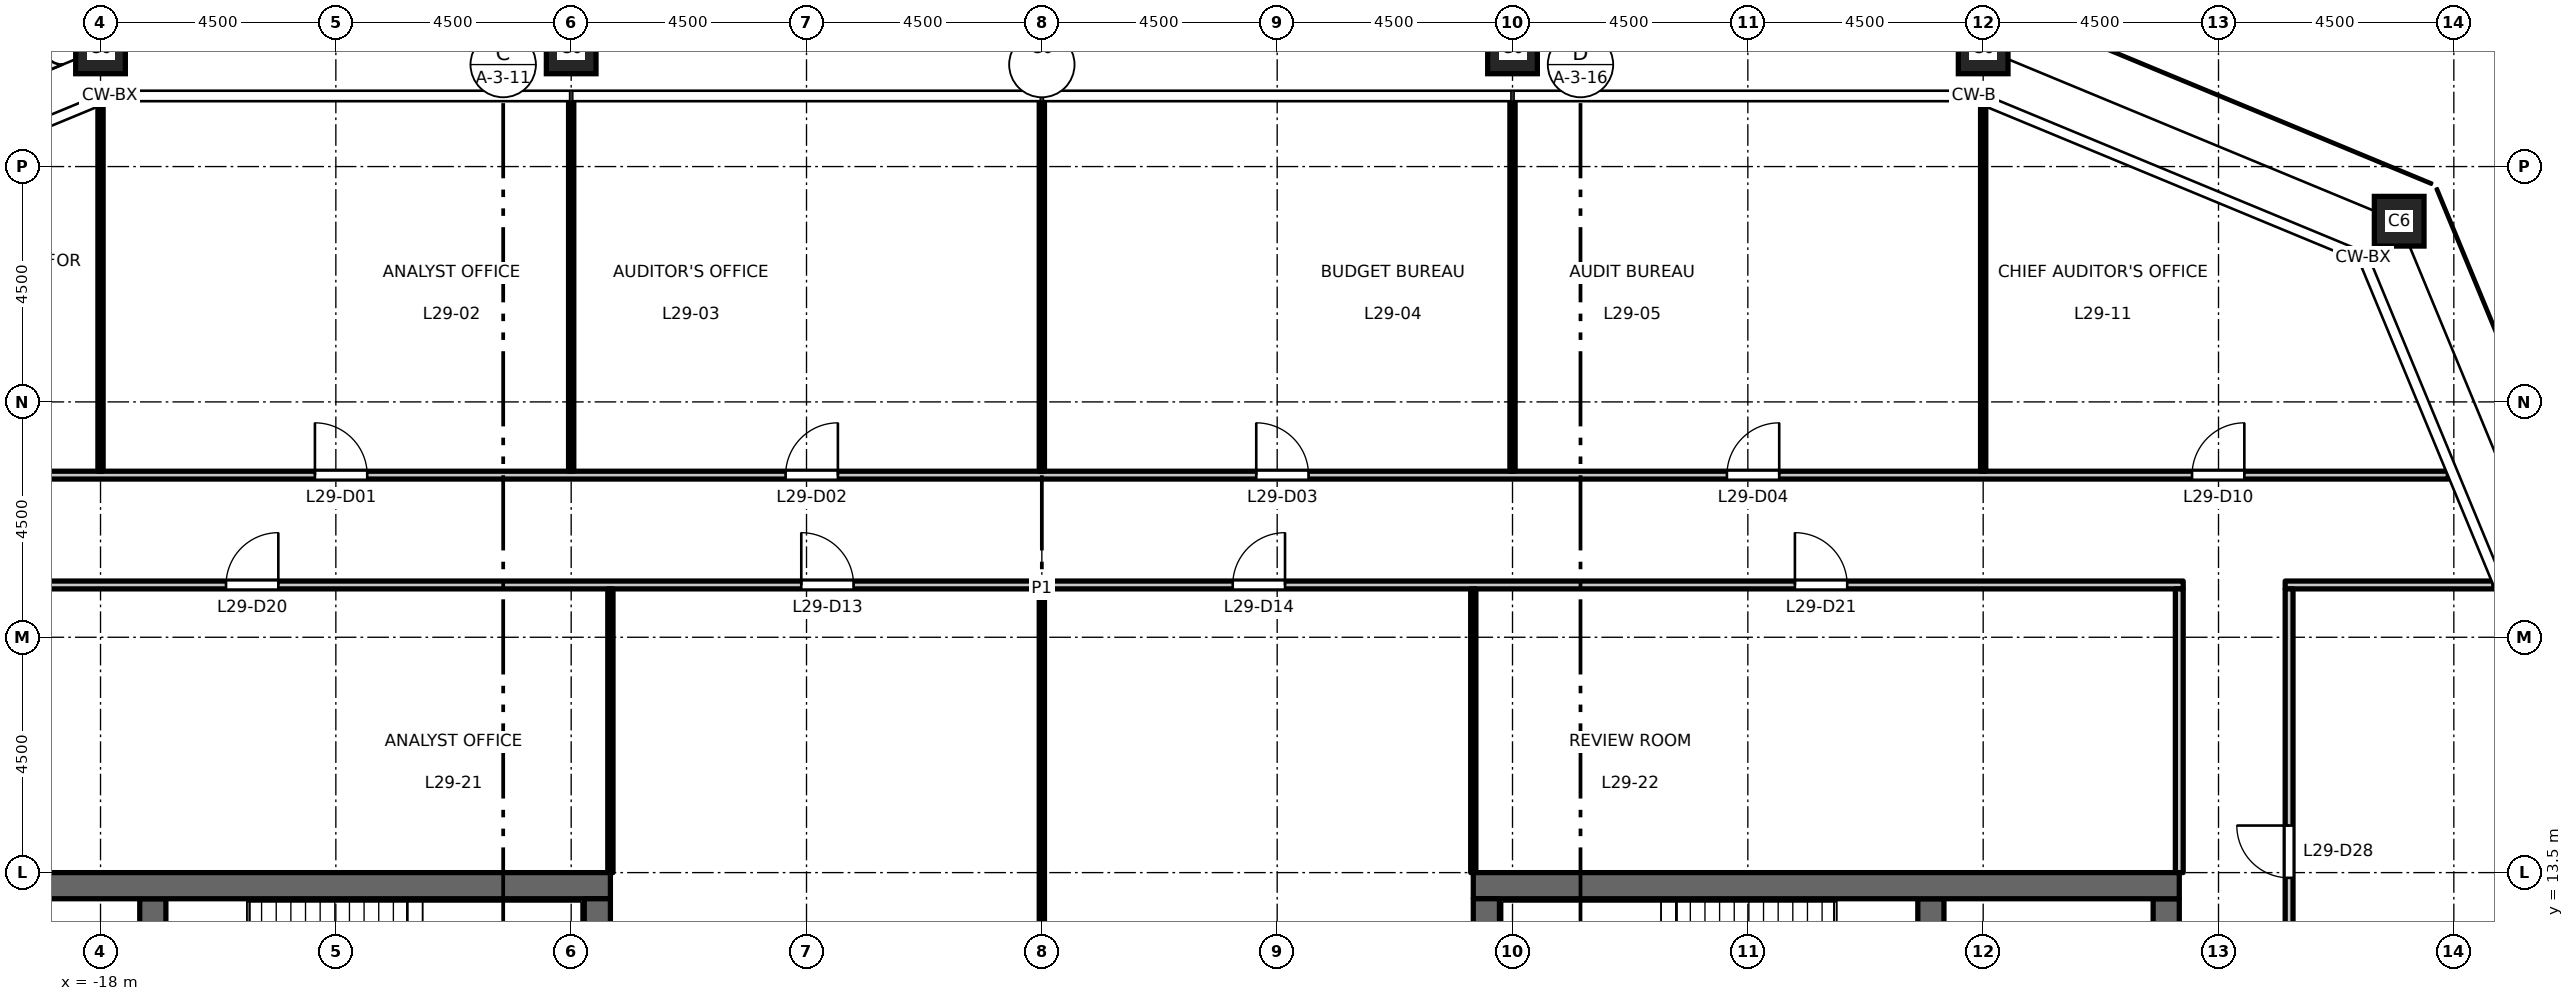
"""IFC4 building model, lengths in metres.
Left out: names, types, materials, properties, quantities, classifications, styles, units other than length and angle.
Written with IfcOpenShell. Run it as: python <this file> out.ifc"""

import sys

from ifc_helpers import new_model, si_unit, direction, frame, frame_2d, origin, origin_2d, place, context, subcontext, project, spatial, rectangle, hollow_rectangle, extrude, element, fill, save


model = new_model("IFC4")
c1 = context("Model", 3, precision=1e-05, world=origin(), true_north=direction((0.0, 1.0)))
c2 = subcontext(c1, "Body", "Model", "MODEL_VIEW")
j1 = project(units=[si_unit("LENGTHUNIT", "METRE"), si_unit("PLANEANGLEUNIT", "RADIAN")], contexts=[c1])
p1 = place(None, origin())
s1 = spatial("IfcSite", under=j1, at=p1, CompositionType="ELEMENT")
p2 = place(p1, origin())
s2 = spatial("IfcBuilding", under=s1, at=p2, CompositionType="ELEMENT")
p3 = place(p2, frame((0.0, 0.0, 136.2)))
s3 = spatial("IfcBuildingStorey", under=s2, at=p3, CompositionType="ELEMENT", Elevation=136.2)
for number, where, z_axis, x_axis in (
    (1, (25.955, 25.955, 0.0), (0.0, 0.0, 1.0), (1.0, 0.0, 0.0)),
    (2, (18.0, 29.25, 0.0), (0.0, 0.0, 1.0), (1.0, 0.0, 0.0)),
    (3, (9.0, 29.25, 0.0), (0.0, 0.0, 1.0), (1.0, 0.0, 0.0)),
    (4, (0.0, 29.25, 0.0), (0.0, 0.0, 1.0), (1.0, 0.0, 0.0)),
    (5, (-9.0, 29.25, 0.0), (0.0, 0.0, 1.0), (1.0, 0.0, 0.0)),
    (6, (-18.0, 29.25, 0.0), (0.0, 0.0, 1.0), (1.0, 0.0, 0.0)),
):
    element("IfcColumn", number, at=place(p3, frame(where, z_axis=z_axis, x_axis=x_axis)), inside=s3, PredefinedType="COLUMN", context=c2, shape_type="SweptSolid", body=[
        extrude(hollow_rectangle(XDim=0.95, YDim=0.95, WallThickness=0.055, at=origin_2d()), origin(), (0.0, 0.0, 1.0), 4.5),
    ])
p4 = place(p3, frame((-17.0, 6.425, 0.0), z_axis=(0.0, 0.0, 1.0), x_axis=(0.0, 1.0, 0.0)))
e7 = element("IfcWall", 7, at=p4, inside=s3, PredefinedType="SHEAR", context=c2, shape_type="SweptSolid", body=[
    extrude(rectangle(XDim=6.575, YDim=0.5, at=frame_2d((3.288, 0.0))), origin(), (0.0, 0.0, 1.0), 4.35),
])
p5 = place(p3, frame((-8.25, 13.25, 0.0), z_axis=(0.0, 0.0, 1.0), x_axis=(-1.0, 0.0, 0.0)))
e8 = element("IfcWall", 8, at=p5, inside=s3, PredefinedType="SHEAR", context=c2, shape_type="SweptSolid", body=[
    extrude(rectangle(XDim=13.5, YDim=0.5, at=frame_2d((6.75, 0.0))), origin(), (0.0, 0.0, 1.0), 4.35),
])
p6 = place(p3, frame((-8.5, -13.0, 0.0), z_axis=(0.0, 0.0, 1.0), x_axis=(0.0, 1.0, 0.0)))
e9 = element("IfcWall", 9, at=p6, inside=s3, PredefinedType="SHEAR", context=c2, shape_type="SweptSolid", body=[
    extrude(rectangle(XDim=26.0, YDim=0.5, at=frame_2d((13.0, 0.0))), origin(), (0.0, 0.0, 1.0), 4.35),
])
p7 = place(p3, frame((21.5, -13.0, 0.0), z_axis=(0.0, 0.0, 1.0), x_axis=(0.0, 1.0, 0.0)))
e10 = element("IfcWall", 10, at=p7, inside=s3, PredefinedType="SHEAR", context=c2, shape_type="SweptSolid", body=[
    extrude(rectangle(XDim=26.0, YDim=0.5, at=frame_2d((13.0, 0.0))), origin(), (0.0, 0.0, 1.0), 4.35),
])
p8 = place(p7, frame((16.825, 0.0, 0.0)))
e11 = element("IfcOpeningElement", 11, at=p8, cuts=e10, PredefinedType="OPENING", context=c2, shape_type="SweptSolid", body=[
    extrude(rectangle(XDim=1.8, YDim=2.1, at=frame_2d((0.9, 1.05))), frame((0.0, 0.26, 0.0), z_axis=(0.0, -1.0, 0.0), x_axis=(1.0, 0.0, 0.0)), (0.0, 0.0, 1.0), 0.52),
])
p9 = place(p7, frame((7.375, 0.0, 0.0)))
e12 = element("IfcOpeningElement", 12, at=p9, cuts=e10, PredefinedType="OPENING", context=c2, shape_type="SweptSolid", body=[
    extrude(rectangle(XDim=1.8, YDim=2.1, at=frame_2d((0.9, 1.05))), frame((0.0, 0.26, 0.0), z_axis=(0.0, -1.0, 0.0), x_axis=(1.0, 0.0, 0.0)), (0.0, 0.0, 1.0), 0.52),
])
p10 = place(p7, frame((2.65, 0.0, 0.0)))
e13 = element("IfcOpeningElement", 13, at=p10, cuts=e10, PredefinedType="OPENING", context=c2, shape_type="SweptSolid", body=[
    extrude(rectangle(XDim=0.9, YDim=2.1, at=frame_2d((0.45, 1.05))), frame((0.0, 0.26, 0.0), z_axis=(0.0, -1.0, 0.0), x_axis=(1.0, 0.0, 0.0)), (0.0, 0.0, 1.0), 0.52),
])
p11 = place(p3, frame((17.0, 6.425, 0.0), z_axis=(0.0, 0.0, 1.0), x_axis=(0.0, 1.0, 0.0)))
e14 = element("IfcWall", 14, at=p11, inside=s3, PredefinedType="SHEAR", context=c2, shape_type="SweptSolid", body=[
    extrude(rectangle(XDim=6.575, YDim=0.5, at=frame_2d((3.288, 0.0))), origin(), (0.0, 0.0, 1.0), 4.35),
])
p12 = place(p3, frame((8.25, 13.25, 0.0), z_axis=(0.0, 0.0, 1.0), x_axis=(1.0, 0.0, 0.0)))
e15 = element("IfcWall", 15, at=p12, inside=s3, PredefinedType="SHEAR", context=c2, shape_type="SweptSolid", body=[
    extrude(rectangle(XDim=13.5, YDim=0.5, at=frame_2d((6.75, 0.0))), origin(), (0.0, 0.0, 1.0), 4.35),
])
p13 = place(p3, frame((8.5, -13.0, 0.0), z_axis=(0.0, 0.0, 1.0), x_axis=(0.0, 1.0, 0.0)))
e16 = element("IfcWall", 16, at=p13, inside=s3, PredefinedType="SHEAR", context=c2, shape_type="SweptSolid", body=[
    extrude(rectangle(XDim=26.0, YDim=0.5, at=frame_2d((13.0, 0.0))), origin(), (0.0, 0.0, 1.0), 4.35),
])
p14 = place(p3, frame((-21.825, 19.0, 0.0), z_axis=(0.0, 0.0, 1.0), x_axis=(1.0, 0.0, 0.0)))
e17 = element("IfcWall", 17, at=p14, inside=s3, PredefinedType="PARTITIONING", context=c2, shape_type="SweptSolid", body=[
    extrude(rectangle(XDim=43.65, YDim=0.15, at=frame_2d((21.825, 0.0))), origin(), (0.0, 0.0, 1.0), 4.35),
])
p15 = place(p14, frame((17.225, 0.0, 0.0)))
e18 = element("IfcOpeningElement", 18, at=p15, cuts=e17, PredefinedType="OPENING", context=c2, shape_type="SweptSolid", body=[
    extrude(rectangle(XDim=1.0, YDim=2.1, at=frame_2d((0.5, 1.05))), frame((0.0, 0.085, 0.0), z_axis=(0.0, -1.0, 0.0), x_axis=(1.0, 0.0, 0.0)), (0.0, 0.0, 1.0), 0.17),
])
p16 = place(p14, frame((25.475, 0.0, 0.0)))
e19 = element("IfcOpeningElement", 19, at=p16, cuts=e17, PredefinedType="OPENING", context=c2, shape_type="SweptSolid", body=[
    extrude(rectangle(XDim=1.0, YDim=2.1, at=frame_2d((0.5, 1.05))), frame((0.0, 0.085, 0.0), z_axis=(0.0, -1.0, 0.0), x_axis=(1.0, 0.0, 0.0)), (0.0, 0.0, 1.0), 0.17),
])
p17 = place(p14, frame((6.225, 0.0, 0.0)))
e20 = element("IfcOpeningElement", 20, at=p17, cuts=e17, PredefinedType="OPENING", context=c2, shape_type="SweptSolid", body=[
    extrude(rectangle(XDim=1.0, YDim=2.1, at=frame_2d((0.5, 1.05))), frame((0.0, 0.085, 0.0), z_axis=(0.0, -1.0, 0.0), x_axis=(1.0, 0.0, 0.0)), (0.0, 0.0, 1.0), 0.17),
])
p18 = place(p14, frame((36.225, 0.0, 0.0)))
e21 = element("IfcOpeningElement", 21, at=p18, cuts=e17, PredefinedType="OPENING", context=c2, shape_type="SweptSolid", body=[
    extrude(rectangle(XDim=1.0, YDim=2.1, at=frame_2d((0.5, 1.05))), frame((0.0, 0.085, 0.0), z_axis=(0.0, -1.0, 0.0), x_axis=(1.0, 0.0, 0.0)), (0.0, 0.0, 1.0), 0.17),
])
p19 = place(p3, frame((23.775, 19.0, 0.0), z_axis=(0.0, 0.0, 1.0), x_axis=(1.0, 0.0, 0.0)))
e22 = element("IfcWall", 22, at=p19, inside=s3, PredefinedType="PARTITIONING", context=c2, shape_type="SweptSolid", body=[
    extrude(rectangle(XDim=3.989, YDim=0.15, at=frame_2d((1.995, 0.0))), origin(), (0.0, 0.0, 1.0), 4.35),
])
p20 = place(p3, frame((-26.894, 21.1, 0.0), z_axis=(0.0, 0.0, 1.0), x_axis=(1.0, 0.0, 0.0)))
e23 = element("IfcWall", 23, at=p20, inside=s3, PredefinedType="PARTITIONING", context=c2, shape_type="SweptSolid", body=[
    extrude(rectangle(XDim=53.788, YDim=0.15, at=frame_2d((26.894, 0.0))), origin(), (0.0, 0.0, 1.0), 4.35),
])
p21 = place(p20, frame((12.994, 0.0, 0.0)))
e24 = element("IfcOpeningElement", 24, at=p21, cuts=e23, PredefinedType="OPENING", context=c2, shape_type="SweptSolid", body=[
    extrude(rectangle(XDim=1.0, YDim=2.1, at=frame_2d((0.5, 1.05))), frame((0.0, 0.085, 0.0), z_axis=(0.0, -1.0, 0.0), x_axis=(1.0, 0.0, 0.0)), (0.0, 0.0, 1.0), 0.17),
])
p22 = place(p20, frame((21.994, 0.0, 0.0)))
e25 = element("IfcOpeningElement", 25, at=p22, cuts=e23, PredefinedType="OPENING", context=c2, shape_type="SweptSolid", body=[
    extrude(rectangle(XDim=1.0, YDim=2.1, at=frame_2d((0.5, 1.05))), frame((0.0, 0.085, 0.0), z_axis=(0.0, -1.0, 0.0), x_axis=(1.0, 0.0, 0.0)), (0.0, 0.0, 1.0), 0.17),
])
p23 = place(p20, frame((30.994, 0.0, 0.0)))
e26 = element("IfcOpeningElement", 26, at=p23, cuts=e23, PredefinedType="OPENING", context=c2, shape_type="SweptSolid", body=[
    extrude(rectangle(XDim=1.0, YDim=2.1, at=frame_2d((0.5, 1.05))), frame((0.0, 0.085, 0.0), z_axis=(0.0, -1.0, 0.0), x_axis=(1.0, 0.0, 0.0)), (0.0, 0.0, 1.0), 0.17),
])
p24 = place(p20, frame((39.994, 0.0, 0.0)))
e27 = element("IfcOpeningElement", 27, at=p24, cuts=e23, PredefinedType="OPENING", context=c2, shape_type="SweptSolid", body=[
    extrude(rectangle(XDim=1.0, YDim=2.1, at=frame_2d((0.5, 1.05))), frame((0.0, 0.085, 0.0), z_axis=(0.0, -1.0, 0.0), x_axis=(1.0, 0.0, 0.0)), (0.0, 0.0, 1.0), 0.17),
])
p25 = place(p20, frame((3.994, 0.0, 0.0)))
e28 = element("IfcOpeningElement", 28, at=p25, cuts=e23, PredefinedType="OPENING", context=c2, shape_type="SweptSolid", body=[
    extrude(rectangle(XDim=1.0, YDim=2.1, at=frame_2d((0.5, 1.05))), frame((0.0, 0.085, 0.0), z_axis=(0.0, -1.0, 0.0), x_axis=(1.0, 0.0, 0.0)), (0.0, 0.0, 1.0), 0.17),
])
p26 = place(p20, frame((48.888, 0.0, 0.0)))
e29 = element("IfcOpeningElement", 29, at=p26, cuts=e23, PredefinedType="OPENING", context=c2, shape_type="SweptSolid", body=[
    extrude(rectangle(XDim=1.0, YDim=2.1, at=frame_2d((0.5, 1.05))), frame((0.0, 0.085, 0.0), z_axis=(0.0, -1.0, 0.0), x_axis=(1.0, 0.0, 0.0)), (0.0, 0.0, 1.0), 0.17),
])
p27 = place(p3, frame((-18.0, 21.175, 0.0), z_axis=(0.0, 0.0, 1.0), x_axis=(0.0, 1.0, 0.0)))
e30 = element("IfcWall", 30, at=p27, inside=s3, PredefinedType="PARTITIONING", context=c2, shape_type="SweptSolid", body=[
    extrude(rectangle(XDim=7.003, YDim=0.1, at=frame_2d((3.501, 0.0))), origin(), (0.0, 0.0, 1.0), 3.45),
])
p28 = place(p3, frame((-9.0, 21.175, 0.0), z_axis=(0.0, 0.0, 1.0), x_axis=(0.0, 1.0, 0.0)))
e31 = element("IfcWall", 31, at=p28, inside=s3, PredefinedType="PARTITIONING", context=c2, shape_type="SweptSolid", body=[
    extrude(rectangle(XDim=7.085, YDim=0.1, at=frame_2d((3.542, 0.0))), origin(), (0.0, 0.0, 1.0), 3.45),
])
p29 = place(p3, frame((-8.25, 13.5, 0.0), z_axis=(0.0, 0.0, 1.0), x_axis=(0.0, 1.0, 0.0)))
e32 = element("IfcWall", 32, at=p29, inside=s3, PredefinedType="PARTITIONING", context=c2, shape_type="SweptSolid", body=[
    extrude(rectangle(XDim=5.425, YDim=0.1, at=frame_2d((2.712, 0.0))), origin(), (0.0, 0.0, 1.0), 4.35),
])
p30 = place(p3, frame((0.0, 8.65, 0.0), z_axis=(0.0, 0.0, 1.0), x_axis=(0.0, 1.0, 0.0)))
e33 = element("IfcWall", 33, at=p30, inside=s3, PredefinedType="PARTITIONING", context=c2, shape_type="SweptSolid", body=[
    extrude(rectangle(XDim=10.275, YDim=0.1, at=frame_2d((5.138, 0.0))), origin(), (0.0, 0.0, 1.0), 3.45),
])
p31 = place(p3, frame((0.0, 21.175, 0.0), z_axis=(0.0, 0.0, 1.0), x_axis=(0.0, 1.0, 0.0)))
e34 = element("IfcWall", 34, at=p31, inside=s3, PredefinedType="PARTITIONING", context=c2, shape_type="SweptSolid", body=[
    extrude(rectangle(XDim=7.085, YDim=0.1, at=frame_2d((3.542, 0.0))), origin(), (0.0, 0.0, 1.0), 3.45),
])
p32 = place(p3, frame((8.25, 13.5, 0.0), z_axis=(0.0, 0.0, 1.0), x_axis=(0.0, 1.0, 0.0)))
e35 = element("IfcWall", 35, at=p32, inside=s3, PredefinedType="PARTITIONING", context=c2, shape_type="SweptSolid", body=[
    extrude(rectangle(XDim=5.425, YDim=0.1, at=frame_2d((2.712, 0.0))), origin(), (0.0, 0.0, 1.0), 4.35),
])
p33 = place(p3, frame((9.0, 21.175, 0.0), z_axis=(0.0, 0.0, 1.0), x_axis=(0.0, 1.0, 0.0)))
e36 = element("IfcWall", 36, at=p33, inside=s3, PredefinedType="PARTITIONING", context=c2, shape_type="SweptSolid", body=[
    extrude(rectangle(XDim=7.085, YDim=0.1, at=frame_2d((3.542, 0.0))), origin(), (0.0, 0.0, 1.0), 3.45),
])
p34 = place(p3, frame((18.0, 21.175, 0.0), z_axis=(0.0, 0.0, 1.0), x_axis=(0.0, 1.0, 0.0)))
e37 = element("IfcWall", 37, at=p34, inside=s3, PredefinedType="PARTITIONING", context=c2, shape_type="SweptSolid", body=[
    extrude(rectangle(XDim=7.003, YDim=0.1, at=frame_2d((3.501, 0.0))), origin(), (0.0, 0.0, 1.0), 3.45),
])
p35 = place(p3, frame((21.75, 13.5, 0.0), z_axis=(0.0, 0.0, 1.0), x_axis=(0.0, 1.0, 0.0)))
e38 = element("IfcWall", 38, at=p35, inside=s3, PredefinedType="PARTITIONING", context=c2, shape_type="SweptSolid", body=[
    extrude(rectangle(XDim=5.425, YDim=0.15, at=frame_2d((2.712, 0.0))), origin(), (0.0, 0.0, 1.0), 4.35),
])
p36 = place(p3, frame((23.85, -18.925, 0.0), z_axis=(0.0, 0.0, 1.0), x_axis=(0.0, 1.0, 0.0)))
e39 = element("IfcWall", 39, at=p36, inside=s3, PredefinedType="PARTITIONING", context=c2, shape_type="SweptSolid", body=[
    extrude(rectangle(XDim=37.85, YDim=0.15, at=frame_2d((18.925, 0.0))), origin(), (0.0, 0.0, 1.0), 4.35),
])
p37 = place(p36, frame((4.325, 0.0, 0.0)))
e40 = element("IfcOpeningElement", 40, at=p37, cuts=e39, PredefinedType="OPENING", context=c2, shape_type="SweptSolid", body=[
    extrude(rectangle(XDim=1.0, YDim=2.1, at=frame_2d((0.5, 1.05))), frame((0.0, 0.085, 0.0), z_axis=(0.0, -1.0, 0.0), x_axis=(1.0, 0.0, 0.0)), (0.0, 0.0, 1.0), 0.17),
])
p38 = place(p36, frame((13.825, 0.0, 0.0)))
e41 = element("IfcOpeningElement", 41, at=p38, cuts=e39, PredefinedType="OPENING", context=c2, shape_type="SweptSolid", body=[
    extrude(rectangle(XDim=1.0, YDim=2.1, at=frame_2d((0.5, 1.05))), frame((0.0, 0.085, 0.0), z_axis=(0.0, -1.0, 0.0), x_axis=(1.0, 0.0, 0.0)), (0.0, 0.0, 1.0), 0.17),
])
p39 = place(p36, frame((22.825, 0.0, 0.0)))
e42 = element("IfcOpeningElement", 42, at=p39, cuts=e39, PredefinedType="OPENING", context=c2, shape_type="SweptSolid", body=[
    extrude(rectangle(XDim=1.0, YDim=2.1, at=frame_2d((0.5, 1.05))), frame((0.0, 0.085, 0.0), z_axis=(0.0, -1.0, 0.0), x_axis=(1.0, 0.0, 0.0)), (0.0, 0.0, 1.0), 0.17),
])
p40 = place(p36, frame((32.325, 0.0, 0.0)))
e43 = element("IfcOpeningElement", 43, at=p40, cuts=e39, PredefinedType="OPENING", context=c2, shape_type="SweptSolid", body=[
    extrude(rectangle(XDim=1.0, YDim=2.1, at=frame_2d((0.5, 1.05))), frame((0.0, 0.085, 0.0), z_axis=(0.0, -1.0, 0.0), x_axis=(1.0, 0.0, 0.0)), (0.0, 0.0, 1.0), 0.17),
])
p41 = place(p21, origin())
e44 = element("IfcDoor", 44, at=p41, inside=s3, OperationType="SINGLE_SWING_LEFT", PredefinedType="DOOR", context=c2, shape_type="SweptSolid", body=[
    extrude(rectangle(XDim=1.0, YDim=2.1, at=frame_2d((0.5, 1.05))), frame((0.0, 0.025, 0.0), z_axis=(0.0, -1.0, 0.0), x_axis=(1.0, 0.0, 0.0)), (0.0, 0.0, 1.0), 0.05),
])
fill(e24, e44)
p42 = place(p22, origin())
e45 = element("IfcDoor", 45, at=p42, inside=s3, OperationType="SINGLE_SWING_RIGHT", PredefinedType="DOOR", context=c2, shape_type="SweptSolid", body=[
    extrude(rectangle(XDim=1.0, YDim=2.1, at=frame_2d((0.5, 1.05))), frame((0.0, 0.025, 0.0), z_axis=(0.0, -1.0, 0.0), x_axis=(1.0, 0.0, 0.0)), (0.0, 0.0, 1.0), 0.05),
])
fill(e25, e45)
p43 = place(p23, origin())
e46 = element("IfcDoor", 46, at=p43, inside=s3, OperationType="SINGLE_SWING_LEFT", PredefinedType="DOOR", context=c2, shape_type="SweptSolid", body=[
    extrude(rectangle(XDim=1.0, YDim=2.1, at=frame_2d((0.5, 1.05))), frame((0.0, 0.025, 0.0), z_axis=(0.0, -1.0, 0.0), x_axis=(1.0, 0.0, 0.0)), (0.0, 0.0, 1.0), 0.05),
])
fill(e26, e46)
p44 = place(p24, origin())
e47 = element("IfcDoor", 47, at=p44, inside=s3, OperationType="SINGLE_SWING_RIGHT", PredefinedType="DOOR", context=c2, shape_type="SweptSolid", body=[
    extrude(rectangle(XDim=1.0, YDim=2.1, at=frame_2d((0.5, 1.05))), frame((0.0, 0.025, 0.0), z_axis=(0.0, -1.0, 0.0), x_axis=(1.0, 0.0, 0.0)), (0.0, 0.0, 1.0), 0.05),
])
fill(e27, e47)
p45 = place(p26, origin())
e48 = element("IfcDoor", 48, at=p45, inside=s3, OperationType="SINGLE_SWING_RIGHT", PredefinedType="DOOR", context=c2, shape_type="SweptSolid", body=[
    extrude(rectangle(XDim=1.0, YDim=2.1, at=frame_2d((0.5, 1.05))), frame((0.0, 0.025, 0.0), z_axis=(0.0, -1.0, 0.0), x_axis=(1.0, 0.0, 0.0)), (0.0, 0.0, 1.0), 0.05),
])
fill(e29, e48)
p46 = place(p15, origin())
e49 = element("IfcDoor", 49, at=p46, inside=s3, OperationType="SINGLE_SWING_LEFT", PredefinedType="DOOR", context=c2, shape_type="SweptSolid", body=[
    extrude(rectangle(XDim=1.0, YDim=2.1, at=frame_2d((0.5, 1.05))), frame((0.0, 0.025, 0.0), z_axis=(0.0, -1.0, 0.0), x_axis=(1.0, 0.0, 0.0)), (0.0, 0.0, 1.0), 0.05),
])
fill(e18, e49)
p47 = place(p16, origin())
e50 = element("IfcDoor", 50, at=p47, inside=s3, OperationType="SINGLE_SWING_RIGHT", PredefinedType="DOOR", context=c2, shape_type="SweptSolid", body=[
    extrude(rectangle(XDim=1.0, YDim=2.1, at=frame_2d((0.5, 1.05))), frame((0.0, 0.025, 0.0), z_axis=(0.0, -1.0, 0.0), x_axis=(1.0, 0.0, 0.0)), (0.0, 0.0, 1.0), 0.05),
])
fill(e19, e50)
p48 = place(p17, origin())
e51 = element("IfcDoor", 51, at=p48, inside=s3, OperationType="SINGLE_SWING_RIGHT", PredefinedType="DOOR", context=c2, shape_type="SweptSolid", body=[
    extrude(rectangle(XDim=1.0, YDim=2.1, at=frame_2d((0.5, 1.05))), frame((0.0, 0.025, 0.0), z_axis=(0.0, -1.0, 0.0), x_axis=(1.0, 0.0, 0.0)), (0.0, 0.0, 1.0), 0.05),
])
fill(e20, e51)
p49 = place(p18, origin())
e52 = element("IfcDoor", 52, at=p49, inside=s3, OperationType="SINGLE_SWING_LEFT", PredefinedType="DOOR", context=c2, shape_type="SweptSolid", body=[
    extrude(rectangle(XDim=1.0, YDim=2.1, at=frame_2d((0.5, 1.05))), frame((0.0, 0.025, 0.0), z_axis=(0.0, -1.0, 0.0), x_axis=(1.0, 0.0, 0.0)), (0.0, 0.0, 1.0), 0.05),
])
fill(e21, e52)
p50 = place(p40, origin())
e53 = element("IfcDoor", 53, at=p50, inside=s3, OperationType="SINGLE_SWING_RIGHT", PredefinedType="DOOR", context=c2, shape_type="SweptSolid", body=[
    extrude(rectangle(XDim=1.0, YDim=2.1, at=frame_2d((0.5, 1.05))), frame((0.0, 0.025, 0.0), z_axis=(0.0, -1.0, 0.0), x_axis=(1.0, 0.0, 0.0)), (0.0, 0.0, 1.0), 0.05),
])
fill(e43, e53)
save(model, sys.argv[1])
